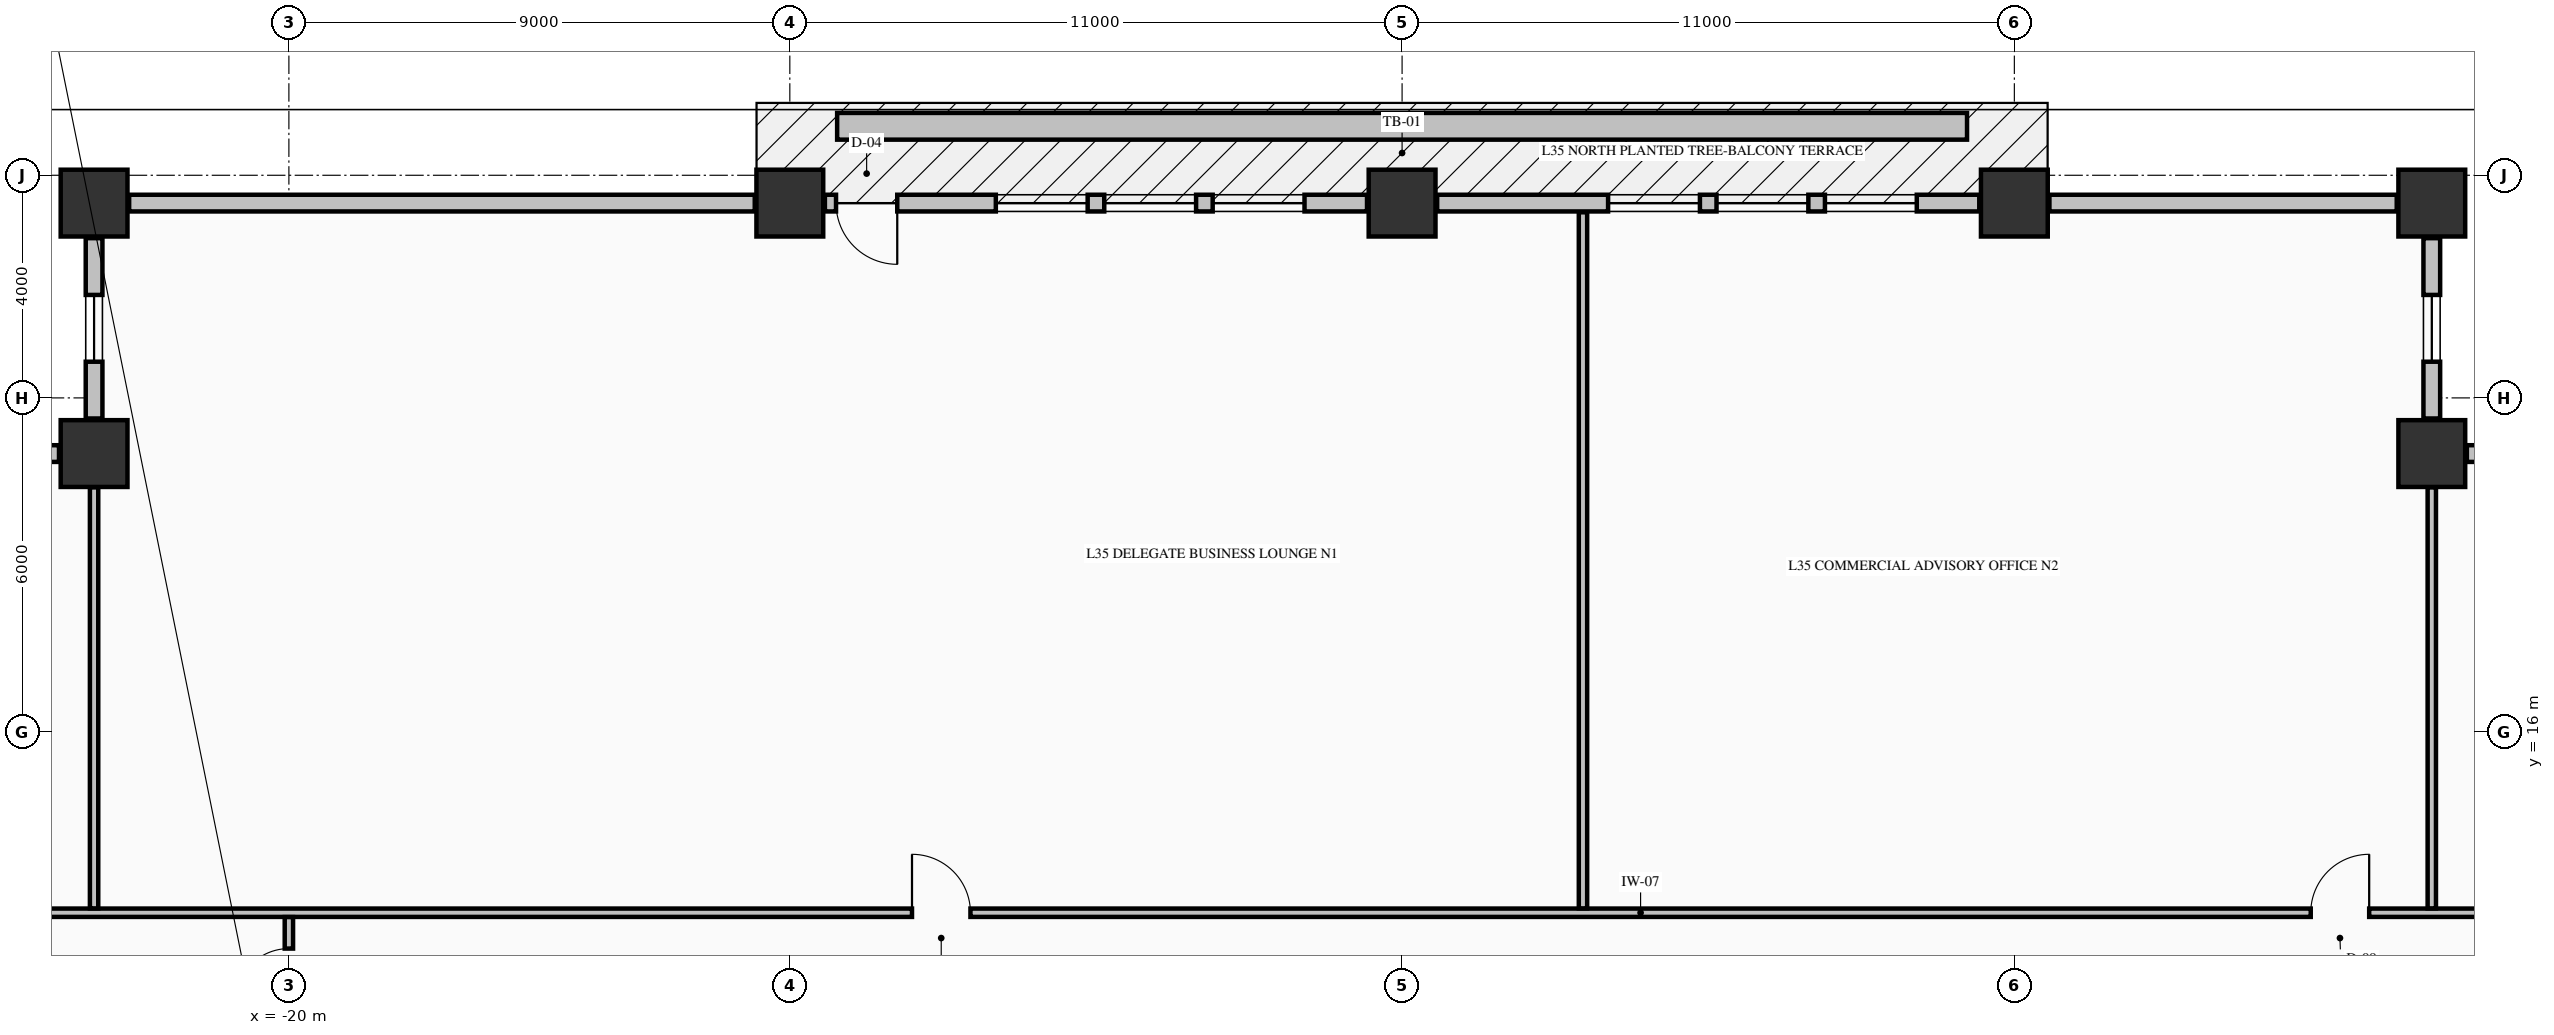
"""IFC4 building model, lengths in metres.
Left out: names, types, materials, properties, quantities, classifications, styles, units other than length and angle.
Written with IfcOpenShell. Run it as: python <this file> out.ifc"""

import sys

from ifc_helpers import new_model, si_unit, direction, frame, frame_2d, origin, origin_2d, place, context, subcontext, project, spatial, rectangle, extrude, element, fill, save


model = new_model("IFC4")
c1 = context("Model", 3, precision=1e-05, world=origin(), true_north=direction((0.0, 1.0)))
c2 = subcontext(c1, "Body", "Model", "MODEL_VIEW")
j1 = project(units=[si_unit("LENGTHUNIT", "METRE"), si_unit("PLANEANGLEUNIT", "RADIAN")], contexts=[c1])
p1 = place(None, origin())
s1 = spatial("IfcSite", under=j1, at=p1, CompositionType="ELEMENT")
p2 = place(p1, origin())
s2 = spatial("IfcBuilding", under=s1, at=p2, CompositionType="ELEMENT")
p3 = place(p2, frame((0.0, 0.0, 139.2)))
s3 = spatial("IfcBuildingStorey", under=s2, at=p3, CompositionType="ELEMENT", Elevation=139.2)
for number, where, z_axis, x_axis in (
    (1, (-23.5, 25.5, -0.25), (0.0, 0.0, 1.0), (1.0, 0.0, 0.0)),
    (2, (-11.0, 25.5, -0.25), (0.0, 0.0, 1.0), (1.0, 0.0, 0.0)),
    (3, (0.0, 25.5, -0.25), (0.0, 0.0, 1.0), (1.0, 0.0, 0.0)),
    (4, (11.0, 25.5, -0.25), (0.0, 0.0, 1.0), (1.0, 0.0, 0.0)),
    (5, (18.5, 25.5, -0.25), (0.0, 0.0, 1.0), (1.0, 0.0, 0.0)),
    (6, (18.5, 21.0, -0.25), (0.0, 0.0, 1.0), (1.0, 0.0, 0.0)),
    (7, (-23.5, 21.0, -0.25), (0.0, 0.0, 1.0), (1.0, 0.0, 0.0)),
):
    element("IfcColumn", number, at=place(p3, frame(where, z_axis=z_axis, x_axis=x_axis)), inside=s3, PredefinedType="COLUMN", context=c2, shape_type="SweptSolid", body=[
        extrude(rectangle(XDim=1.2, YDim=1.2, at=origin_2d()), origin(), (0.0, 0.0, 1.0), 3.495),
    ])
p4 = place(p3, frame((22.37, 21.0, 0.0), z_axis=(0.0, 0.0, 1.0), x_axis=(-1.0, 0.0, 0.0)))
e8 = element("IfcWall", 8, at=p4, inside=s3, PredefinedType="STANDARD", context=c2, shape_type="SweptSolid", body=[
    extrude(rectangle(XDim=3.24, YDim=0.3, at=frame_2d((1.62, 0.0))), origin(), (0.0, 0.0, 1.0), 2.637),
])
p5 = place(p4, frame((1.02, 0.0, 0.82)))
e9 = element("IfcOpeningElement", 9, at=p5, cuts=e8, PredefinedType="OPENING", context=c2, shape_type="SweptSolid", body=[
    extrude(rectangle(XDim=1.2, YDim=1.65, at=frame_2d((0.6, 0.825))), frame((0.0, 0.16, 0.0), z_axis=(0.0, -1.0, 0.0), x_axis=(1.0, 0.0, 0.0)), (0.0, 0.0, 1.0), 0.32),
])
p6 = place(p3, frame((18.5, 21.63, 0.0), z_axis=(0.0, 0.0, 1.0), x_axis=(0.0, 1.0, 0.0)))
e10 = element("IfcWall", 10, at=p6, inside=s3, PredefinedType="STANDARD", context=c2, shape_type="SweptSolid", body=[
    extrude(rectangle(XDim=3.24, YDim=0.3, at=frame_2d((1.62, 0.0))), origin(), (0.0, 0.0, 1.0), 2.637),
])
p7 = place(p6, frame((1.02, 0.0, 0.82)))
e11 = element("IfcOpeningElement", 11, at=p7, cuts=e10, PredefinedType="OPENING", context=c2, shape_type="SweptSolid", body=[
    extrude(rectangle(XDim=1.2, YDim=1.65, at=frame_2d((0.6, 0.825))), frame((0.0, 0.16, 0.0), z_axis=(0.0, -1.0, 0.0), x_axis=(1.0, 0.0, 0.0)), (0.0, 0.0, 1.0), 0.32),
])
p8 = place(p3, frame((-23.5, 24.87, 0.0), z_axis=(0.0, 0.0, 1.0), x_axis=(0.0, -1.0, 0.0)))
e12 = element("IfcWall", 12, at=p8, inside=s3, PredefinedType="STANDARD", context=c2, shape_type="SweptSolid", body=[
    extrude(rectangle(XDim=3.24, YDim=0.3, at=frame_2d((1.62, 0.0))), origin(), (0.0, 0.0, 1.0), 2.637),
])
p9 = place(p8, frame((1.02, 0.0, 0.82)))
e13 = element("IfcOpeningElement", 13, at=p9, cuts=e12, PredefinedType="OPENING", context=c2, shape_type="SweptSolid", body=[
    extrude(rectangle(XDim=1.2, YDim=1.65, at=frame_2d((0.6, 0.825))), frame((0.0, 0.16, 0.0), z_axis=(0.0, -1.0, 0.0), x_axis=(1.0, 0.0, 0.0)), (0.0, 0.0, 1.0), 0.32),
])
p10 = place(p3, frame((-24.13, 21.0, 0.0), z_axis=(0.0, 0.0, 1.0), x_axis=(-1.0, 0.0, 0.0)))
e14 = element("IfcWall", 14, at=p10, inside=s3, PredefinedType="STANDARD", context=c2, shape_type="SweptSolid", body=[
    extrude(rectangle(XDim=3.24, YDim=0.3, at=frame_2d((1.62, 0.0))), origin(), (0.0, 0.0, 1.0), 2.637),
])
p11 = place(p10, frame((1.02, 0.0, 0.82)))
e15 = element("IfcOpeningElement", 15, at=p11, cuts=e14, PredefinedType="OPENING", context=c2, shape_type="SweptSolid", body=[
    extrude(rectangle(XDim=1.2, YDim=1.65, at=frame_2d((0.6, 0.825))), frame((0.0, 0.16, 0.0), z_axis=(0.0, -1.0, 0.0), x_axis=(1.0, 0.0, 0.0)), (0.0, 0.0, 1.0), 0.32),
])
p12 = place(p3, frame((-11.63, 25.5, 0.0), z_axis=(0.0, 0.0, 1.0), x_axis=(-1.0, 0.0, 0.0)))
e16 = element("IfcWall", 16, at=p12, inside=s3, PredefinedType="STANDARD", context=c2, shape_type="SweptSolid", body=[
    extrude(rectangle(XDim=11.24, YDim=0.3, at=frame_2d((5.62, 0.0))), origin(), (0.0, 0.0, 1.0), 2.637),
])
p13 = place(p3, frame((-0.63, 25.5, 0.0), z_axis=(0.0, 0.0, 1.0), x_axis=(-1.0, 0.0, 0.0)))
e17 = element("IfcWall", 17, at=p13, inside=s3, PredefinedType="STANDARD", context=c2, shape_type="SweptSolid", body=[
    extrude(rectangle(XDim=9.74, YDim=0.3, at=frame_2d((4.87, 0.0))), origin(), (0.0, 0.0, 1.0), 2.637),
])
p14 = place(p13, frame((8.44, 0.0, 0.0)))
e18 = element("IfcOpeningElement", 18, at=p14, cuts=e17, PredefinedType="OPENING", context=c2, shape_type="SweptSolid", body=[
    extrude(rectangle(XDim=1.1, YDim=2.15, at=frame_2d((0.55, 1.075))), frame((0.0, 0.16, 0.0), z_axis=(0.0, -1.0, 0.0), x_axis=(1.0, 0.0, 0.0)), (0.0, 0.0, 1.0), 0.32),
])
p15 = place(p13, frame((1.123, 0.0, 0.8)))
e19 = element("IfcOpeningElement", 19, at=p15, cuts=e17, PredefinedType="OPENING", context=c2, shape_type="SweptSolid", body=[
    extrude(rectangle(XDim=1.65, YDim=1.7, at=frame_2d((0.825, 0.85))), frame((0.0, 0.16, 0.0), z_axis=(0.0, -1.0, 0.0), x_axis=(1.0, 0.0, 0.0)), (0.0, 0.0, 1.0), 0.32),
])
p16 = place(p13, frame((3.071, 0.0, 0.8)))
e20 = element("IfcOpeningElement", 20, at=p16, cuts=e17, PredefinedType="OPENING", context=c2, shape_type="SweptSolid", body=[
    extrude(rectangle(XDim=1.65, YDim=1.7, at=frame_2d((0.825, 0.85))), frame((0.0, 0.16, 0.0), z_axis=(0.0, -1.0, 0.0), x_axis=(1.0, 0.0, 0.0)), (0.0, 0.0, 1.0), 0.32),
])
p17 = place(p13, frame((5.019, 0.0, 0.8)))
e21 = element("IfcOpeningElement", 21, at=p17, cuts=e17, PredefinedType="OPENING", context=c2, shape_type="SweptSolid", body=[
    extrude(rectangle(XDim=1.65, YDim=1.7, at=frame_2d((0.825, 0.85))), frame((0.0, 0.16, 0.0), z_axis=(0.0, -1.0, 0.0), x_axis=(1.0, 0.0, 0.0)), (0.0, 0.0, 1.0), 0.32),
])
p18 = place(p3, frame((10.37, 25.5, 0.0), z_axis=(0.0, 0.0, 1.0), x_axis=(-1.0, 0.0, 0.0)))
e22 = element("IfcWall", 22, at=p18, inside=s3, PredefinedType="STANDARD", context=c2, shape_type="SweptSolid", body=[
    extrude(rectangle(XDim=9.74, YDim=0.3, at=frame_2d((4.87, 0.0))), origin(), (0.0, 0.0, 1.0), 2.637),
])
p19 = place(p18, frame((1.123, 0.0, 0.8)))
e23 = element("IfcOpeningElement", 23, at=p19, cuts=e22, PredefinedType="OPENING", context=c2, shape_type="SweptSolid", body=[
    extrude(rectangle(XDim=1.65, YDim=1.7, at=frame_2d((0.825, 0.85))), frame((0.0, 0.16, 0.0), z_axis=(0.0, -1.0, 0.0), x_axis=(1.0, 0.0, 0.0)), (0.0, 0.0, 1.0), 0.32),
])
p20 = place(p18, frame((3.071, 0.0, 0.8)))
e24 = element("IfcOpeningElement", 24, at=p20, cuts=e22, PredefinedType="OPENING", context=c2, shape_type="SweptSolid", body=[
    extrude(rectangle(XDim=1.65, YDim=1.7, at=frame_2d((0.825, 0.85))), frame((0.0, 0.16, 0.0), z_axis=(0.0, -1.0, 0.0), x_axis=(1.0, 0.0, 0.0)), (0.0, 0.0, 1.0), 0.32),
])
p21 = place(p18, frame((5.019, 0.0, 0.8)))
e25 = element("IfcOpeningElement", 25, at=p21, cuts=e22, PredefinedType="OPENING", context=c2, shape_type="SweptSolid", body=[
    extrude(rectangle(XDim=1.65, YDim=1.7, at=frame_2d((0.825, 0.85))), frame((0.0, 0.16, 0.0), z_axis=(0.0, -1.0, 0.0), x_axis=(1.0, 0.0, 0.0)), (0.0, 0.0, 1.0), 0.32),
])
p22 = place(p3, frame((17.87, 25.5, 0.0), z_axis=(0.0, 0.0, 1.0), x_axis=(-1.0, 0.0, 0.0)))
e26 = element("IfcWall", 26, at=p22, inside=s3, PredefinedType="STANDARD", context=c2, shape_type="SweptSolid", body=[
    extrude(rectangle(XDim=6.24, YDim=0.3, at=frame_2d((3.12, 0.0))), origin(), (0.0, 0.0, 1.0), 2.637),
])
p23 = place(p3, frame((-27.835, 12.75, 0.0), z_axis=(0.0, 0.0, 1.0), x_axis=(1.0, 0.0, 0.0)))
e27 = element("IfcWall", 27, at=p23, inside=s3, PredefinedType="PARTITIONING", context=c2, shape_type="SweptSolid", body=[
    extrude(rectangle(XDim=50.67, YDim=0.15, at=frame_2d((25.335, 0.0))), origin(), (0.0, 0.0, 1.0), 3.245),
])
p24 = place(p23, frame((19.03, 0.0, 0.0)))
e28 = element("IfcOpeningElement", 28, at=p24, cuts=e27, PredefinedType="OPENING", context=c2, shape_type="SweptSolid", body=[
    extrude(rectangle(XDim=1.05, YDim=2.15, at=frame_2d((0.525, 1.075))), frame((0.0, 0.085, 0.0), z_axis=(0.0, -1.0, 0.0), x_axis=(1.0, 0.0, 0.0)), (0.0, 0.0, 1.0), 0.17),
])
p25 = place(p23, frame((44.16, 0.0, 0.0)))
e29 = element("IfcOpeningElement", 29, at=p25, cuts=e27, PredefinedType="OPENING", context=c2, shape_type="SweptSolid", body=[
    extrude(rectangle(XDim=1.05, YDim=2.15, at=frame_2d((0.525, 1.075))), frame((0.0, 0.085, 0.0), z_axis=(0.0, -1.0, 0.0), x_axis=(1.0, 0.0, 0.0)), (0.0, 0.0, 1.0), 0.17),
])
p26 = place(p3, frame((-23.5, 12.828, 0.0), z_axis=(0.0, 0.0, 1.0), x_axis=(0.0, 1.0, 0.0)))
e30 = element("IfcWall", 30, at=p26, inside=s3, PredefinedType="PARTITIONING", context=c2, shape_type="SweptSolid", body=[
    extrude(rectangle(XDim=7.566, YDim=0.15, at=frame_2d((3.783, 0.0))), origin(), (0.0, 0.0, 1.0), 3.245),
])
p27 = place(p3, frame((-20.0, 11.006, 0.0), z_axis=(0.0, 0.0, 1.0), x_axis=(0.0, 1.0, 0.0)))
e31 = element("IfcWall", 31, at=p27, inside=s3, PredefinedType="PARTITIONING", context=c2, shape_type="SweptSolid", body=[
    extrude(rectangle(XDim=1.666, YDim=0.15, at=frame_2d((0.833, 0.0))), origin(), (0.0, 0.0, 1.0), 2.735),
])
p28 = place(p27, frame((0.15, 0.0, 0.0)))
e32 = element("IfcOpeningElement", 32, at=p28, cuts=e31, PredefinedType="OPENING", context=c2, shape_type="SweptSolid", body=[
    extrude(rectangle(XDim=0.95, YDim=2.15, at=frame_2d((0.475, 1.075))), frame((0.0, 0.085, 0.0), z_axis=(0.0, -1.0, 0.0), x_axis=(1.0, 0.0, 0.0)), (0.0, 0.0, 1.0), 0.17),
])
p29 = place(p3, frame((3.25, 12.828, 0.0), z_axis=(0.0, 0.0, 1.0), x_axis=(0.0, 1.0, 0.0)))
e33 = element("IfcWall", 33, at=p29, inside=s3, PredefinedType="PARTITIONING", context=c2, shape_type="SweptSolid", body=[
    extrude(rectangle(XDim=12.507, YDim=0.15, at=frame_2d((6.253, 0.0))), origin(), (0.0, 0.0, 1.0), 3.245),
])
p30 = place(p3, frame((18.5, 12.828, 0.0), z_axis=(0.0, 0.0, 1.0), x_axis=(0.0, 1.0, 0.0)))
e34 = element("IfcWall", 34, at=p30, inside=s3, PredefinedType="PARTITIONING", context=c2, shape_type="SweptSolid", body=[
    extrude(rectangle(XDim=7.566, YDim=0.15, at=frame_2d((3.783, 0.0))), origin(), (0.0, 0.0, 1.0), 3.245),
])
p31 = place(p3, frame((-10.15, 26.88, -0.04), z_axis=(0.0, 0.0, 1.0), x_axis=(1.0, 0.0, 0.0)))
e35 = element("IfcWall", 35, at=p31, inside=s3, PredefinedType="PARAPET", context=c2, shape_type="SweptSolid", body=[
    extrude(rectangle(XDim=20.3, YDim=0.48, at=frame_2d((10.15, 0.0))), origin(), (0.0, 0.0, 1.0), 0.52),
])
p32 = place(p7, origin())
e36 = element("IfcWindow", 36, at=p32, inside=s3, PartitioningType="SINGLE_PANEL", PredefinedType="WINDOW", context=c2, shape_type="SweptSolid", body=[
    extrude(rectangle(XDim=1.2, YDim=1.65, at=frame_2d((0.6, 0.825))), frame((0.0, 0.03, 0.0), z_axis=(0.0, -1.0, 0.0), x_axis=(1.0, 0.0, 0.0)), (0.0, 0.0, 1.0), 0.06),
])
fill(e11, e36)
p33 = place(p9, origin())
e37 = element("IfcWindow", 37, at=p33, inside=s3, PartitioningType="SINGLE_PANEL", PredefinedType="WINDOW", context=c2, shape_type="SweptSolid", body=[
    extrude(rectangle(XDim=1.2, YDim=1.65, at=frame_2d((0.6, 0.825))), frame((0.0, 0.03, 0.0), z_axis=(0.0, -1.0, 0.0), x_axis=(1.0, 0.0, 0.0)), (0.0, 0.0, 1.0), 0.06),
])
fill(e13, e37)
p34 = place(p14, origin())
e38 = element("IfcDoor", 38, at=p34, inside=s3, OperationType="SINGLE_SWING_LEFT", PredefinedType="DOOR", context=c2, shape_type="SweptSolid", body=[
    extrude(rectangle(XDim=1.1, YDim=2.15, at=frame_2d((0.55, 1.075))), frame((0.0, 0.025, 0.0), z_axis=(0.0, -1.0, 0.0), x_axis=(1.0, 0.0, 0.0)), (0.0, 0.0, 1.0), 0.05),
])
fill(e18, e38)
p35 = place(p15, origin())
e39 = element("IfcWindow", 39, at=p35, inside=s3, PartitioningType="SINGLE_PANEL", PredefinedType="WINDOW", context=c2, shape_type="SweptSolid", body=[
    extrude(rectangle(XDim=1.65, YDim=1.7, at=frame_2d((0.825, 0.85))), frame((0.0, 0.03, 0.0), z_axis=(0.0, -1.0, 0.0), x_axis=(1.0, 0.0, 0.0)), (0.0, 0.0, 1.0), 0.06),
])
fill(e19, e39)
p36 = place(p16, origin())
e40 = element("IfcWindow", 40, at=p36, inside=s3, PartitioningType="SINGLE_PANEL", PredefinedType="WINDOW", context=c2, shape_type="SweptSolid", body=[
    extrude(rectangle(XDim=1.65, YDim=1.7, at=frame_2d((0.825, 0.85))), frame((0.0, 0.03, 0.0), z_axis=(0.0, -1.0, 0.0), x_axis=(1.0, 0.0, 0.0)), (0.0, 0.0, 1.0), 0.06),
])
fill(e20, e40)
p37 = place(p17, origin())
e41 = element("IfcWindow", 41, at=p37, inside=s3, PartitioningType="SINGLE_PANEL", PredefinedType="WINDOW", context=c2, shape_type="SweptSolid", body=[
    extrude(rectangle(XDim=1.65, YDim=1.7, at=frame_2d((0.825, 0.85))), frame((0.0, 0.03, 0.0), z_axis=(0.0, -1.0, 0.0), x_axis=(1.0, 0.0, 0.0)), (0.0, 0.0, 1.0), 0.06),
])
fill(e21, e41)
p38 = place(p19, origin())
e42 = element("IfcWindow", 42, at=p38, inside=s3, PartitioningType="SINGLE_PANEL", PredefinedType="WINDOW", context=c2, shape_type="SweptSolid", body=[
    extrude(rectangle(XDim=1.65, YDim=1.7, at=frame_2d((0.825, 0.85))), frame((0.0, 0.03, 0.0), z_axis=(0.0, -1.0, 0.0), x_axis=(1.0, 0.0, 0.0)), (0.0, 0.0, 1.0), 0.06),
])
fill(e23, e42)
p39 = place(p20, origin())
e43 = element("IfcWindow", 43, at=p39, inside=s3, PartitioningType="SINGLE_PANEL", PredefinedType="WINDOW", context=c2, shape_type="SweptSolid", body=[
    extrude(rectangle(XDim=1.65, YDim=1.7, at=frame_2d((0.825, 0.85))), frame((0.0, 0.03, 0.0), z_axis=(0.0, -1.0, 0.0), x_axis=(1.0, 0.0, 0.0)), (0.0, 0.0, 1.0), 0.06),
])
fill(e24, e43)
p40 = place(p21, origin())
e44 = element("IfcWindow", 44, at=p40, inside=s3, PartitioningType="SINGLE_PANEL", PredefinedType="WINDOW", context=c2, shape_type="SweptSolid", body=[
    extrude(rectangle(XDim=1.65, YDim=1.7, at=frame_2d((0.825, 0.85))), frame((0.0, 0.03, 0.0), z_axis=(0.0, -1.0, 0.0), x_axis=(1.0, 0.0, 0.0)), (0.0, 0.0, 1.0), 0.06),
])
fill(e25, e44)
p41 = place(p24, origin())
e45 = element("IfcDoor", 45, at=p41, inside=s3, OperationType="SINGLE_SWING_LEFT", PredefinedType="DOOR", context=c2, shape_type="SweptSolid", body=[
    extrude(rectangle(XDim=1.05, YDim=2.15, at=frame_2d((0.525, 1.075))), frame((0.0, 0.025, 0.0), z_axis=(0.0, -1.0, 0.0), x_axis=(1.0, 0.0, 0.0)), (0.0, 0.0, 1.0), 0.05),
])
fill(e28, e45)
p42 = place(p25, origin())
e46 = element("IfcDoor", 46, at=p42, inside=s3, OperationType="SINGLE_SWING_RIGHT", PredefinedType="DOOR", context=c2, shape_type="SweptSolid", body=[
    extrude(rectangle(XDim=1.05, YDim=2.15, at=frame_2d((0.525, 1.075))), frame((0.0, 0.025, 0.0), z_axis=(0.0, -1.0, 0.0), x_axis=(1.0, 0.0, 0.0)), (0.0, 0.0, 1.0), 0.05),
])
fill(e29, e46)
p43 = place(p28, origin())
e47 = element("IfcDoor", 47, at=p43, inside=s3, OperationType="SINGLE_SWING_LEFT", PredefinedType="DOOR", context=c2, shape_type="SweptSolid", body=[
    extrude(rectangle(XDim=0.95, YDim=2.15, at=frame_2d((0.475, 1.075))), frame((0.0, 0.025, 0.0), z_axis=(0.0, -1.0, 0.0), x_axis=(1.0, 0.0, 0.0)), (0.0, 0.0, 1.0), 0.05),
])
fill(e32, e47)
save(model, sys.argv[1])
